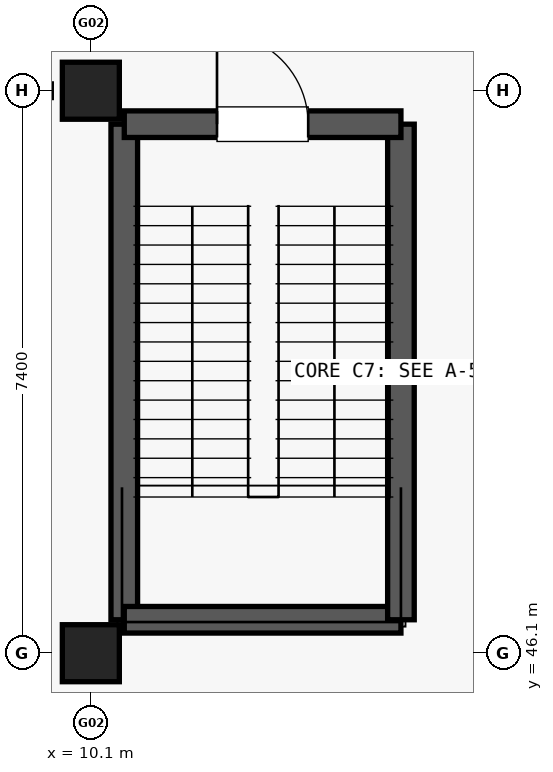
"""IFC4 building model, lengths in metres.
Left out: names, types, materials, properties, quantities, classifications, styles, units other than length and angle.
Written with IfcOpenShell. Run it as: python <this file> out.ifc"""

import sys

from ifc_helpers import new_model, si_unit, direction, frame, frame_2d, origin, origin_2d, place, context, subcontext, project, spatial, rectangle, extrude, element, fill, save


model = new_model("IFC4")
c1 = context("Model", 3, precision=1e-05, world=origin(), true_north=direction((0.0, 1.0)))
c2 = subcontext(c1, "Body", "Model", "MODEL_VIEW")
j1 = project(units=[si_unit("LENGTHUNIT", "METRE"), si_unit("PLANEANGLEUNIT", "RADIAN")], contexts=[c1])
p1 = place(None, origin())
s1 = spatial("IfcSite", under=j1, at=p1, CompositionType="ELEMENT")
p2 = place(p1, origin())
s2 = spatial("IfcBuilding", under=s1, at=p2, CompositionType="ELEMENT")
p3 = place(p2, origin())
s3 = spatial("IfcBuildingStorey", under=s2, at=p3, CompositionType="ELEMENT", Elevation=0.0)
for number, where, z_axis, x_axis in (
    (1, (10.1, 46.1, 0.0), (0.0, 0.0, 1.0), (1.0, 0.0, 0.0)),
    (2, (10.1, 53.5, 0.0), (0.0, 0.0, 1.0), (1.0, 0.0, 0.0)),
):
    element("IfcColumn", number, at=place(p3, frame(where, z_axis=z_axis, x_axis=x_axis)), inside=s3, PredefinedType="COLUMN", context=c2, shape_type="SweptSolid", body=[
        extrude(rectangle(XDim=0.75, YDim=0.75, at=origin_2d()), origin(), (0.0, 0.0, 1.0), 5.135),
    ])
p4 = place(p3, frame((10.54, 46.54, 0.0), z_axis=(0.0, 0.0, 1.0), x_axis=(0.0, 1.0, 0.0)))
e3 = element("IfcWall", 3, at=p4, inside=s3, PredefinedType="SHEAR", context=c2, shape_type="SweptSolid", body=[
    extrude(rectangle(XDim=6.52, YDim=0.35, at=frame_2d((3.26, 0.0))), origin(), (0.0, 0.0, 1.0), 5.13),
])
p5 = place(p3, frame((10.54, 46.54, 0.0), z_axis=(0.0, 0.0, 1.0), x_axis=(1.0, 0.0, 0.0)))
e4 = element("IfcWall", 4, at=p5, inside=s3, PredefinedType="SHEAR", context=c2, shape_type="SweptSolid", body=[
    extrude(rectangle(XDim=3.64, YDim=0.35, at=frame_2d((1.82, 0.0))), origin(), (0.0, 0.0, 1.0), 5.13),
])
p6 = place(p3, frame((14.18, 46.54, 0.0), z_axis=(0.0, 0.0, 1.0), x_axis=(0.0, 1.0, 0.0)))
e5 = element("IfcWall", 5, at=p6, inside=s3, PredefinedType="SHEAR", context=c2, shape_type="SweptSolid", body=[
    extrude(rectangle(XDim=6.52, YDim=0.35, at=frame_2d((3.26, 0.0))), origin(), (0.0, 0.0, 1.0), 5.13),
])
p7 = place(p3, frame((10.54, 53.06, 0.0), z_axis=(0.0, 0.0, 1.0), x_axis=(1.0, 0.0, 0.0)))
e6 = element("IfcWall", 6, at=p7, inside=s3, PredefinedType="SHEAR", context=c2, shape_type="SweptSolid", body=[
    extrude(rectangle(XDim=3.64, YDim=0.35, at=frame_2d((1.82, 0.0))), origin(), (0.0, 0.0, 1.0), 5.13),
])
p8 = place(p7, frame((1.22, 0.0, 0.0)))
e7 = element("IfcOpeningElement", 7, at=p8, cuts=e6, PredefinedType="OPENING", context=c2, shape_type="SweptSolid", body=[
    extrude(rectangle(XDim=1.2, YDim=2.15, at=frame_2d((0.6, 1.075))), frame((0.0, 0.185, 0.0), z_axis=(0.0, -1.0, 0.0), x_axis=(1.0, 0.0, 0.0)), (0.0, 0.0, 1.0), 0.37),
])
p9 = place(p8, origin())
e8 = element("IfcDoor", 8, at=p9, inside=s3, OperationType="SINGLE_SWING_LEFT", PredefinedType="DOOR", context=c2, shape_type="SweptSolid", body=[
    extrude(rectangle(XDim=1.2, YDim=2.15, at=frame_2d((0.6, 1.075))), frame((0.0, 0.025, 0.0), z_axis=(0.0, -1.0, 0.0), x_axis=(1.0, 0.0, 0.0)), (0.0, 0.0, 1.0), 0.05),
])
fill(e7, e8)
save(model, sys.argv[1])
